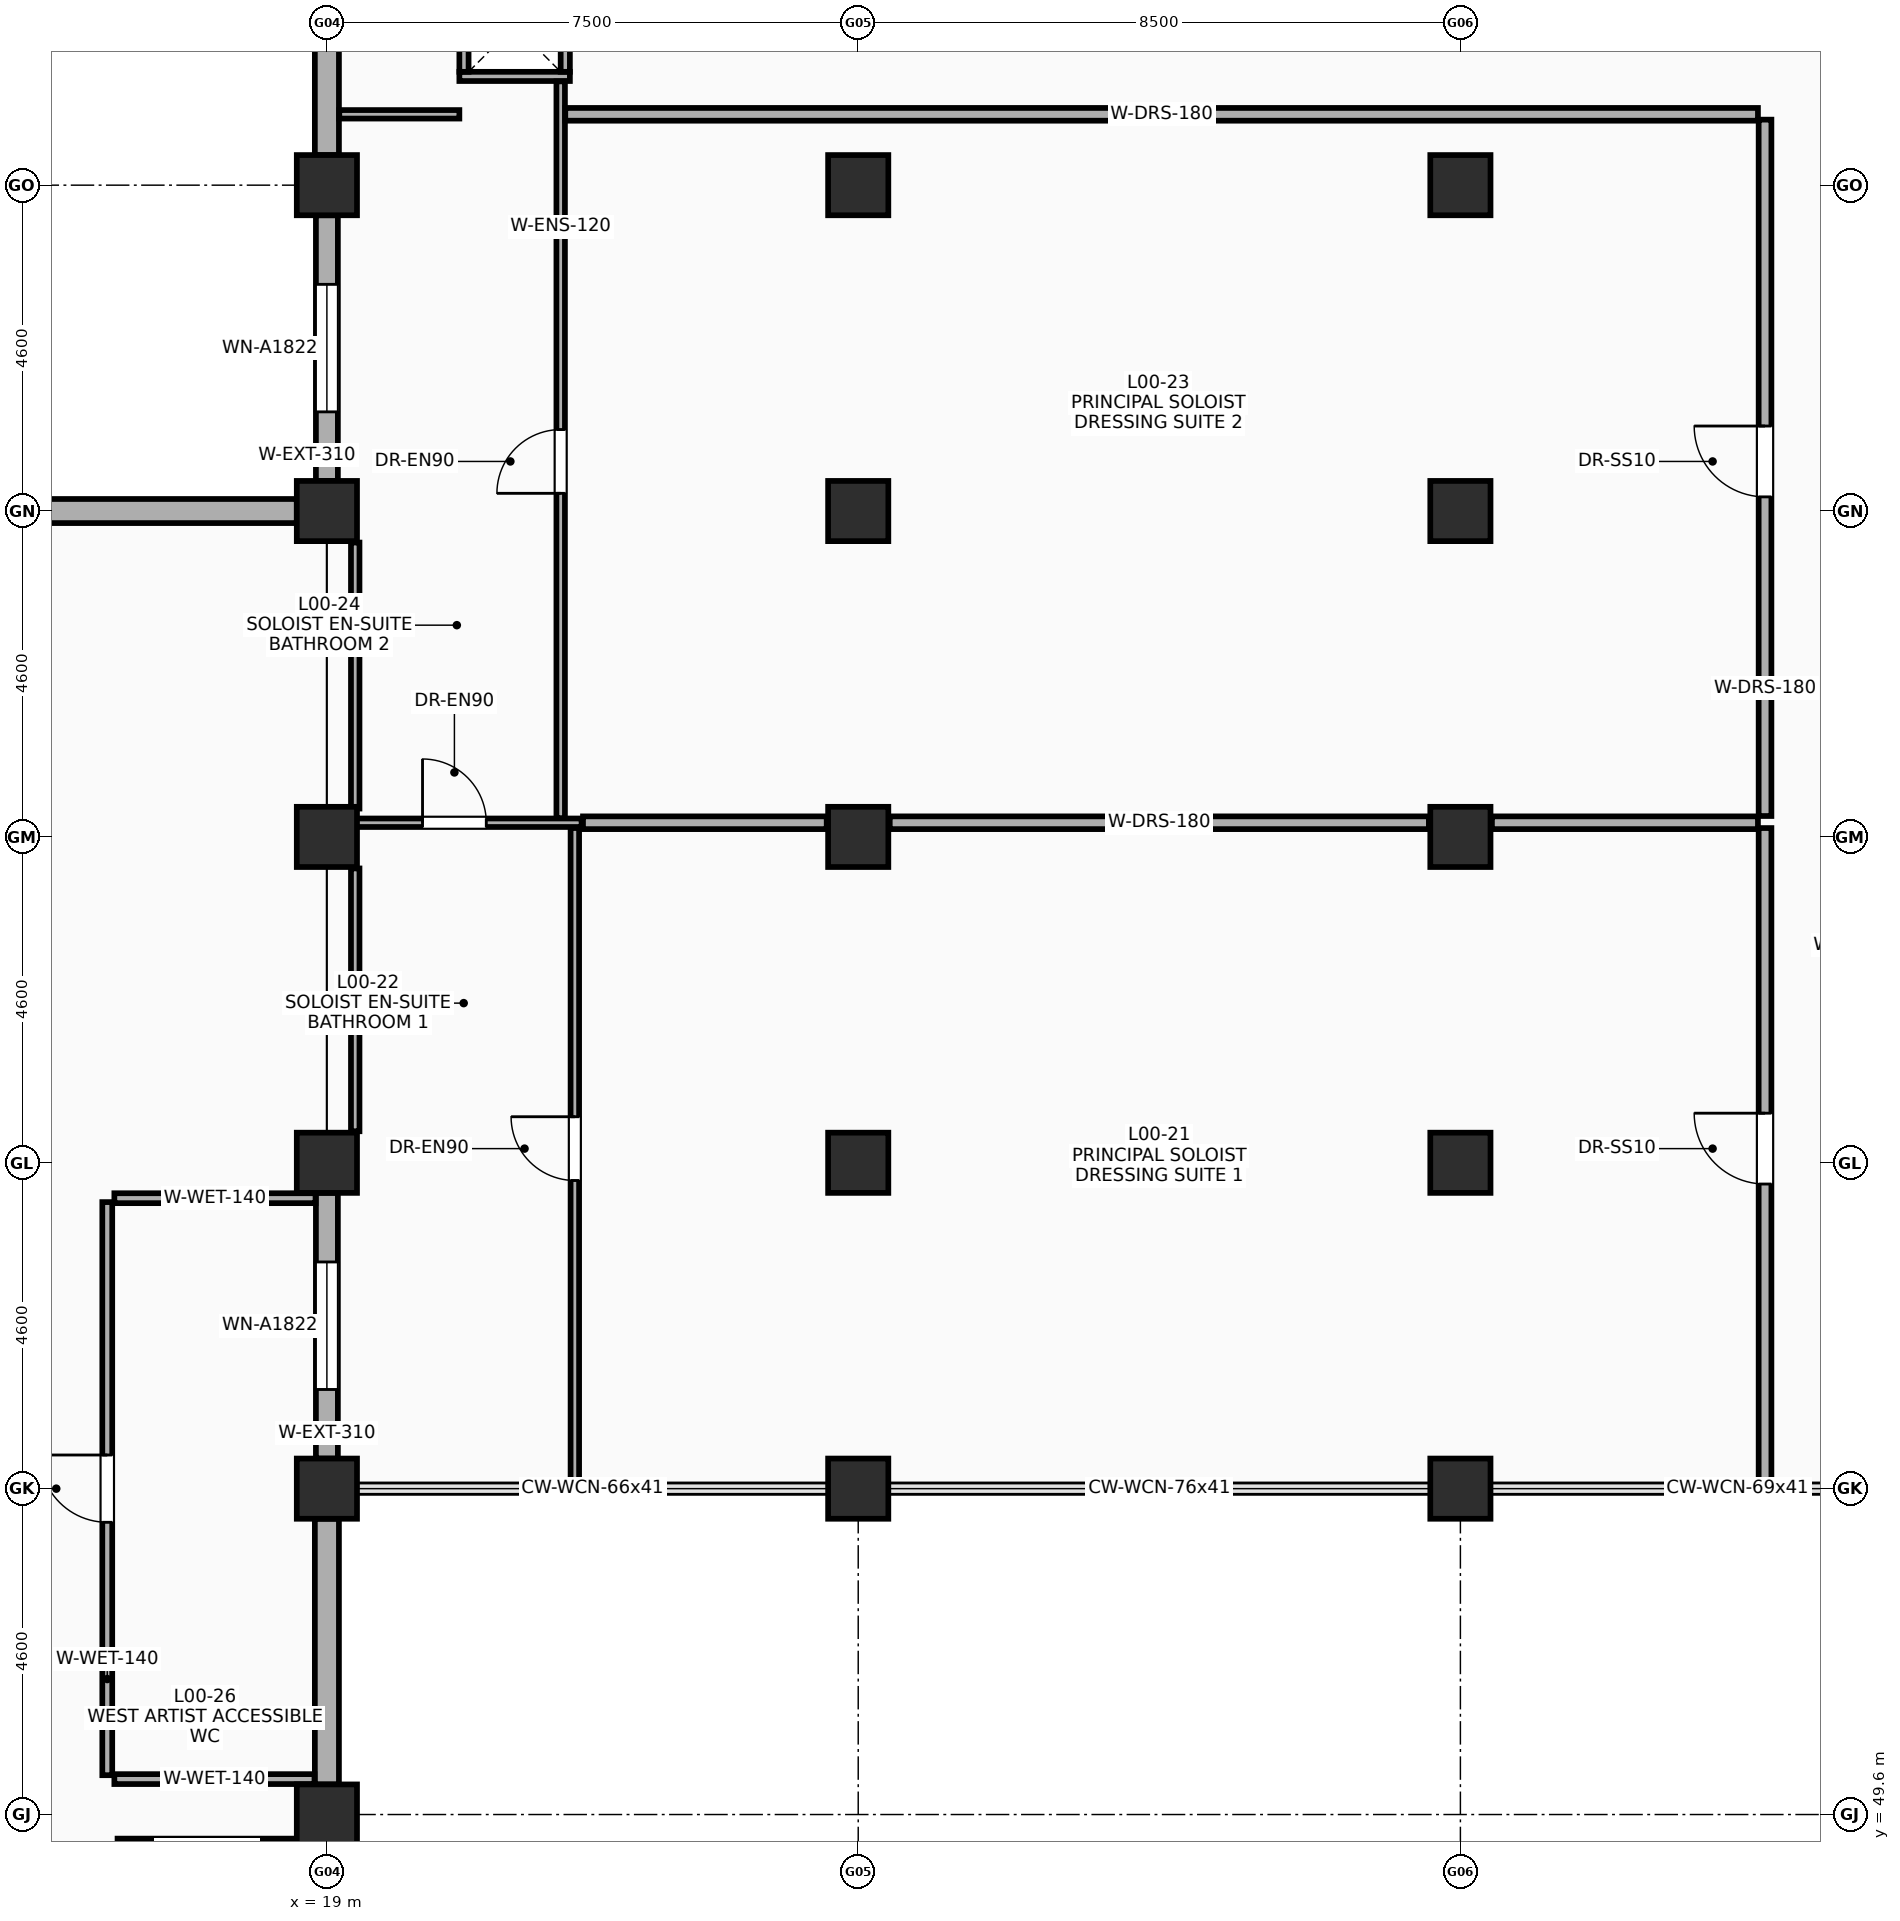
"""IFC4 building model, lengths in metres.
Left out: names, types, materials, properties, quantities, classifications, styles, units other than length and angle.
Written with IfcOpenShell. Run it as: python <this file> out.ifc"""

import sys

from ifc_helpers import new_model, si_unit, direction, frame, frame_2d, origin, origin_2d, place, context, subcontext, project, spatial, rectangle, extrude, element, fill, save


model = new_model("IFC4")
c1 = context("Model", 3, precision=1e-05, world=origin(), true_north=direction((0.0, 1.0)))
c2 = subcontext(c1, "Body", "Model", "MODEL_VIEW")
j1 = project(units=[si_unit("LENGTHUNIT", "METRE"), si_unit("PLANEANGLEUNIT", "RADIAN")], contexts=[c1])
p1 = place(None, origin())
s1 = spatial("IfcSite", under=j1, at=p1, CompositionType="ELEMENT")
p2 = place(p1, origin())
s2 = spatial("IfcBuilding", under=s1, at=p2, CompositionType="ELEMENT")
p3 = place(p2, origin())
s3 = spatial("IfcBuildingStorey", under=s2, at=p3, CompositionType="ELEMENT", Elevation=0.0)
for number, where, z_axis, x_axis in (
    (1, (19.0, 49.6, 0.0), (0.0, 0.0, 1.0), (1.0, 0.0, 0.0)),
    (2, (19.0, 54.2, 0.0), (0.0, 0.0, 1.0), (1.0, 0.0, 0.0)),
    (3, (19.0, 58.8, 0.0), (0.0, 0.0, 1.0), (1.0, 0.0, 0.0)),
    (4, (19.0, 63.4, 0.0), (0.0, 0.0, 1.0), (1.0, 0.0, 0.0)),
    (5, (19.0, 68.0, 0.0), (0.0, 0.0, 1.0), (1.0, 0.0, 0.0)),
    (6, (19.0, 72.6, 0.0), (0.0, 0.0, 1.0), (1.0, 0.0, 0.0)),
    (7, (26.5, 54.2, 0.0), (0.0, 0.0, 1.0), (1.0, 0.0, 0.0)),
    (8, (26.5, 58.8, 0.0), (0.0, 0.0, 1.0), (1.0, 0.0, 0.0)),
    (9, (26.5, 63.4, 0.0), (0.0, 0.0, 1.0), (1.0, 0.0, 0.0)),
    (10, (26.5, 68.0, 0.0), (0.0, 0.0, 1.0), (1.0, 0.0, 0.0)),
    (11, (26.5, 72.6, 0.0), (0.0, 0.0, 1.0), (1.0, 0.0, 0.0)),
    (12, (35.0, 54.2, 0.0), (0.0, 0.0, 1.0), (1.0, 0.0, 0.0)),
    (13, (35.0, 58.8, 0.0), (0.0, 0.0, 1.0), (1.0, 0.0, 0.0)),
    (14, (35.0, 63.4, 0.0), (0.0, 0.0, 1.0), (1.0, 0.0, 0.0)),
    (15, (35.0, 68.0, 0.0), (0.0, 0.0, 1.0), (1.0, 0.0, 0.0)),
    (16, (35.0, 72.6, 0.0), (0.0, 0.0, 1.0), (1.0, 0.0, 0.0)),
):
    element("IfcColumn", number, at=place(p3, frame(where, z_axis=z_axis, x_axis=x_axis)), inside=s3, PredefinedType="COLUMN", context=c2, shape_type="SweptSolid", body=[
        extrude(rectangle(XDim=0.85, YDim=0.85, at=origin_2d()), origin(), (0.0, 0.0, 1.0), 5.4),
    ])
p4 = place(p3, frame((19.0, 54.625, 0.0), z_axis=(0.0, 0.0, 1.0), x_axis=(0.0, 1.0, 0.0)))
e17 = element("IfcWall", 17, at=p4, inside=s3, PredefinedType="SOLIDWALL", context=c2, shape_type="SweptSolid", body=[
    extrude(rectangle(XDim=3.75, YDim=0.31, at=frame_2d((1.875, 0.0))), origin(), (0.0, 0.0, 1.0), 4.15),
])
p5 = place(p4, frame((0.975, 0.0, 0.85)))
e18 = element("IfcOpeningElement", 18, at=p5, cuts=e17, PredefinedType="OPENING", context=c2, shape_type="SweptSolid", body=[
    extrude(rectangle(XDim=1.8, YDim=2.2, at=frame_2d((0.9, 1.1))), frame((0.0, 0.165, 0.0), z_axis=(0.0, -1.0, 0.0), x_axis=(1.0, 0.0, 0.0)), (0.0, 0.0, 1.0), 0.33),
])
p6 = place(p3, frame((19.0, 68.425, 0.0), z_axis=(0.0, 0.0, 1.0), x_axis=(0.0, 1.0, 0.0)))
e19 = element("IfcWall", 19, at=p6, inside=s3, PredefinedType="SOLIDWALL", context=c2, shape_type="SweptSolid", body=[
    extrude(rectangle(XDim=3.75, YDim=0.31, at=frame_2d((1.875, 0.0))), origin(), (0.0, 0.0, 1.0), 4.15),
])
p7 = place(p6, frame((0.975, 0.0, 0.85)))
e20 = element("IfcOpeningElement", 20, at=p7, cuts=e19, PredefinedType="OPENING", context=c2, shape_type="SweptSolid", body=[
    extrude(rectangle(XDim=1.8, YDim=2.2, at=frame_2d((0.9, 1.1))), frame((0.0, 0.165, 0.0), z_axis=(0.0, -1.0, 0.0), x_axis=(1.0, 0.0, 0.0)), (0.0, 0.0, 1.0), 0.33),
])
p8 = place(p3, frame((13.925, 68.0, 0.0), z_axis=(0.0, 0.0, 1.0), x_axis=(1.0, 0.0, 0.0)))
e21 = element("IfcWall", 21, at=p8, inside=s3, PredefinedType="SOLIDWALL", context=c2, shape_type="SweptSolid", body=[
    extrude(rectangle(XDim=4.65, YDim=0.34, at=frame_2d((2.325, 0.0))), origin(), (0.0, 0.0, 1.0), 4.15),
])
p9 = place(p3, frame((19.0, 73.025, 0.0), z_axis=(0.0, 0.0, 1.0), x_axis=(0.0, 1.0, 0.0)))
e22 = element("IfcWall", 22, at=p9, inside=s3, PredefinedType="SOLIDWALL", context=c2, shape_type="SweptSolid", body=[
    extrude(rectangle(XDim=7.75, YDim=0.34, at=frame_2d((3.875, 0.0))), origin(), (0.0, 0.0, 1.0), 4.15),
])
p10 = place(p3, frame((19.0, 50.025, 0.0), z_axis=(0.0, 0.0, 1.0), x_axis=(0.0, 1.0, 0.0)))
e23 = element("IfcWall", 23, at=p10, inside=s3, PredefinedType="SOLIDWALL", context=c2, shape_type="SweptSolid", body=[
    extrude(rectangle(XDim=3.75, YDim=0.34, at=frame_2d((1.875, 0.0))), origin(), (0.0, 0.0, 1.0), 4.15),
])
p11 = place(p3, frame((20.87, 74.135, 0.0), z_axis=(0.0, 0.0, 1.0), x_axis=(1.0, 0.0, 0.0)))
e24 = element("IfcWall", 24, at=p11, inside=s3, PredefinedType="PARTITIONING", context=c2, shape_type="SweptSolid", body=[
    extrude(rectangle(XDim=1.56, YDim=0.13, at=frame_2d((0.78, 0.0))), origin(), (0.0, 0.0, 1.0), 5.1),
])
for number, where, z_axis, x_axis in (
    (25, (20.935, 74.2, 0.0), (0.0, 0.0, 1.0), (0.0, 1.0, 0.0)),
    (26, (22.365, 74.2, 0.0), (0.0, 0.0, 1.0), (0.0, 1.0, 0.0)),
):
    element("IfcWall", number, at=place(p3, frame(where, z_axis=z_axis, x_axis=x_axis)), inside=s3, PredefinedType="PARTITIONING", context=c2, shape_type="SweptSolid", body=[
        extrude(rectangle(XDim=1.3, YDim=0.13, at=frame_2d((0.65, 0.0))), origin(), (0.0, 0.0, 1.0), 5.1),
    ])
p12 = place(p3, frame((22.5, 54.285, 0.0), z_axis=(0.0, 0.0, 1.0), x_axis=(0.0, 1.0, 0.0)))
e27 = element("IfcWall", 27, at=p12, inside=s3, PredefinedType="PARTITIONING", context=c2, shape_type="SweptSolid", body=[
    extrude(rectangle(XDim=9.24, YDim=0.12, at=frame_2d((4.62, 0.0))), origin(), (0.0, 0.0, 1.0), 4.2),
])
p13 = place(p12, frame((4.265, 0.0, 0.0)))
e28 = element("IfcOpeningElement", 28, at=p13, cuts=e27, PredefinedType="OPENING", context=c2, shape_type="SweptSolid", body=[
    extrude(rectangle(XDim=0.9, YDim=2.15, at=frame_2d((0.45, 1.075))), frame((0.0, 0.07, 0.0), z_axis=(0.0, -1.0, 0.0), x_axis=(1.0, 0.0, 0.0)), (0.0, 0.0, 1.0), 0.14),
])
p14 = place(p3, frame((19.4, 63.6, 0.0), z_axis=(0.0, 0.0, 1.0), x_axis=(1.0, 0.0, 0.0)))
e29 = element("IfcWall", 29, at=p14, inside=s3, PredefinedType="PARTITIONING", context=c2, shape_type="SweptSolid", body=[
    extrude(rectangle(XDim=3.195, YDim=0.12, at=frame_2d((1.598, 0.0))), origin(), (0.0, 0.0, 1.0), 4.2),
])
p15 = place(p14, frame((0.95, 0.0, 0.0)))
e30 = element("IfcOpeningElement", 30, at=p15, cuts=e29, PredefinedType="OPENING", context=c2, shape_type="SweptSolid", body=[
    extrude(rectangle(XDim=0.9, YDim=2.15, at=frame_2d((0.45, 1.075))), frame((0.0, 0.07, 0.0), z_axis=(0.0, -1.0, 0.0), x_axis=(1.0, 0.0, 0.0)), (0.0, 0.0, 1.0), 0.14),
])
p16 = place(p3, frame((26.945, 63.6, 0.0), z_axis=(0.0, 0.0, 1.0), x_axis=(1.0, 0.0, 0.0)))
e31 = element("IfcWall", 31, at=p16, inside=s3, PredefinedType="PARTITIONING", context=c2, shape_type="SweptSolid", body=[
    extrude(rectangle(XDim=7.61, YDim=0.18, at=frame_2d((3.805, 0.0))), origin(), (0.0, 0.0, 1.0), 4.2),
])
p17 = place(p3, frame((35.445, 63.6, 0.0), z_axis=(0.0, 0.0, 1.0), x_axis=(1.0, 0.0, 0.0)))
e32 = element("IfcWall", 32, at=p17, inside=s3, PredefinedType="PARTITIONING", context=c2, shape_type="SweptSolid", body=[
    extrude(rectangle(XDim=3.755, YDim=0.18, at=frame_2d((1.877, 0.0))), origin(), (0.0, 0.0, 1.0), 4.2),
])
p18 = place(p3, frame((39.3, 54.285, 0.0), z_axis=(0.0, 0.0, 1.0), x_axis=(0.0, 1.0, 0.0)))
e33 = element("IfcWall", 33, at=p18, inside=s3, PredefinedType="PARTITIONING", context=c2, shape_type="SweptSolid", body=[
    extrude(rectangle(XDim=9.24, YDim=0.18, at=frame_2d((4.62, 0.0))), origin(), (0.0, 0.0, 1.0), 4.2),
])
p19 = place(p18, frame((4.215, 0.0, 0.0)))
e34 = element("IfcOpeningElement", 34, at=p19, cuts=e33, PredefinedType="OPENING", context=c2, shape_type="SweptSolid", body=[
    extrude(rectangle(XDim=1.0, YDim=2.2, at=frame_2d((0.5, 1.1))), frame((0.0, 0.1, 0.0), z_axis=(0.0, -1.0, 0.0), x_axis=(1.0, 0.0, 0.0)), (0.0, 0.0, 1.0), 0.2),
])
p20 = place(p3, frame((22.3, 63.665, 0.0), z_axis=(0.0, 0.0, 1.0), x_axis=(0.0, 1.0, 0.0)))
e35 = element("IfcWall", 35, at=p20, inside=s3, PredefinedType="PARTITIONING", context=c2, shape_type="SweptSolid", body=[
    extrude(rectangle(XDim=10.4, YDim=0.12, at=frame_2d((5.2, 0.0))), origin(), (0.0, 0.0, 1.0), 4.2),
])
p21 = place(p20, frame((4.585, 0.0, 0.0)))
e36 = element("IfcOpeningElement", 36, at=p21, cuts=e35, PredefinedType="OPENING", context=c2, shape_type="SweptSolid", body=[
    extrude(rectangle(XDim=0.9, YDim=2.15, at=frame_2d((0.45, 1.075))), frame((0.0, 0.07, 0.0), z_axis=(0.0, -1.0, 0.0), x_axis=(1.0, 0.0, 0.0)), (0.0, 0.0, 1.0), 0.14),
])
p22 = place(p3, frame((39.3, 63.695, 0.0), z_axis=(0.0, 0.0, 1.0), x_axis=(0.0, 1.0, 0.0)))
e37 = element("IfcWall", 37, at=p22, inside=s3, PredefinedType="PARTITIONING", context=c2, shape_type="SweptSolid", body=[
    extrude(rectangle(XDim=9.83, YDim=0.18, at=frame_2d((4.915, 0.0))), origin(), (0.0, 0.0, 1.0), 4.2),
])
p23 = place(p22, frame((4.505, 0.0, 0.0)))
e38 = element("IfcOpeningElement", 38, at=p23, cuts=e37, PredefinedType="OPENING", context=c2, shape_type="SweptSolid", body=[
    extrude(rectangle(XDim=1.0, YDim=2.2, at=frame_2d((0.5, 1.1))), frame((0.0, 0.1, 0.0), z_axis=(0.0, -1.0, 0.0), x_axis=(1.0, 0.0, 0.0)), (0.0, 0.0, 1.0), 0.2),
])
p24 = place(p3, frame((15.9, 50.155, 0.0), z_axis=(0.0, 0.0, 1.0), x_axis=(0.0, 1.0, 0.0)))
e39 = element("IfcWall", 39, at=p24, inside=s3, PredefinedType="PARTITIONING", context=c2, shape_type="SweptSolid", body=[
    extrude(rectangle(XDim=8.09, YDim=0.14, at=frame_2d((4.045, 0.0))), origin(), (0.0, 0.0, 1.0), 4.4),
])
p25 = place(p24, frame((3.57, 0.0, 0.0)))
e40 = element("IfcOpeningElement", 40, at=p25, cuts=e39, PredefinedType="OPENING", context=c2, shape_type="SweptSolid", body=[
    extrude(rectangle(XDim=0.95, YDim=2.1, at=frame_2d((0.475, 1.05))), frame((0.0, 0.08, 0.0), z_axis=(0.0, -1.0, 0.0), x_axis=(1.0, 0.0, 0.0)), (0.0, 0.0, 1.0), 0.16),
])
p26 = place(p3, frame((19.4, 59.245, 0.0), z_axis=(0.0, 0.0, 1.0), x_axis=(0.0, 1.0, 0.0)))
e41 = element("IfcWall", 41, at=p26, inside=s3, PredefinedType="PARTITIONING", context=c2, shape_type="SweptSolid", body=[
    extrude(rectangle(XDim=3.71, YDim=0.12, at=frame_2d((1.855, 0.0))), origin(), (0.0, 0.0, 1.0), 5.1),
])
p27 = place(p3, frame((19.175, 73.6, 0.0), z_axis=(0.0, 0.0, 1.0), x_axis=(1.0, 0.0, 0.0)))
e42 = element("IfcWall", 42, at=p27, inside=s3, PredefinedType="PARTITIONING", context=c2, shape_type="SweptSolid", body=[
    extrude(rectangle(XDim=1.695, YDim=0.12, at=frame_2d((0.848, 0.0))), origin(), (0.0, 0.0, 1.0), 4.2),
])
p28 = place(p3, frame((19.4, 63.8, 0.0), z_axis=(0.0, 0.0, 1.0), x_axis=(0.0, 1.0, 0.0)))
e43 = element("IfcWall", 43, at=p28, inside=s3, PredefinedType="PARTITIONING", context=c2, shape_type="SweptSolid", body=[
    extrude(rectangle(XDim=3.755, YDim=0.12, at=frame_2d((1.877, 0.0))), origin(), (0.0, 0.0, 1.0), 4.2),
])
p29 = place(p3, frame((22.365, 73.6, 0.0), z_axis=(0.0, 0.0, 1.0), x_axis=(1.0, 0.0, 0.0)))
e44 = element("IfcWall", 44, at=p29, inside=s3, PredefinedType="PARTITIONING", context=c2, shape_type="SweptSolid", body=[
    extrude(rectangle(XDim=16.835, YDim=0.18, at=frame_2d((8.417, 0.0))), origin(), (0.0, 0.0, 1.0), 4.2),
])
p30 = place(p3, frame((16.045, 49.1, 0.0), z_axis=(0.0, 0.0, 1.0), x_axis=(1.0, 0.0, 0.0)))
e45 = element("IfcWall", 45, at=p30, inside=s3, PredefinedType="PARTITIONING", context=c2, shape_type="SweptSolid", body=[
    extrude(rectangle(XDim=2.525, YDim=0.32, at=frame_2d((1.263, 0.0))), origin(), (0.0, 0.0, 1.0), 5.1),
])
p31 = place(p3, frame((16.0, 50.1, 0.0), z_axis=(0.0, 0.0, 1.0), x_axis=(1.0, 0.0, 0.0)))
e46 = element("IfcWall", 46, at=p31, inside=s3, PredefinedType="PARTITIONING", context=c2, shape_type="SweptSolid", body=[
    extrude(rectangle(XDim=2.825, YDim=0.14, at=frame_2d((1.413, 0.0))), origin(), (0.0, 0.0, 1.0), 4.4),
])
p32 = place(p3, frame((16.0, 58.3, 0.0), z_axis=(0.0, 0.0, 1.0), x_axis=(1.0, 0.0, 0.0)))
e47 = element("IfcWall", 47, at=p32, inside=s3, PredefinedType="PARTITIONING", context=c2, shape_type="SweptSolid", body=[
    extrude(rectangle(XDim=2.84, YDim=0.14, at=frame_2d((1.42, 0.0))), origin(), (0.0, 0.0, 1.0), 4.4),
])
p33 = place(p3, frame((22.615, 63.6, 0.0), z_axis=(0.0, 0.0, 1.0), x_axis=(1.0, 0.0, 0.0)))
e48 = element("IfcWall", 48, at=p33, inside=s3, PredefinedType="PARTITIONING", context=c2, shape_type="SweptSolid", body=[
    extrude(rectangle(XDim=3.44, YDim=0.18, at=frame_2d((1.72, 0.0))), origin(), (0.0, 0.0, 1.0), 4.2),
])
p34 = place(p5, origin())
e49 = element("IfcWindow", 49, at=p34, inside=s3, PartitioningType="SINGLE_PANEL", PredefinedType="WINDOW", context=c2, shape_type="SweptSolid", body=[
    extrude(rectangle(XDim=1.8, YDim=2.2, at=frame_2d((0.9, 1.1))), frame((0.0, 0.03, 0.0), z_axis=(0.0, -1.0, 0.0), x_axis=(1.0, 0.0, 0.0)), (0.0, 0.0, 1.0), 0.06),
])
fill(e18, e49)
p35 = place(p7, origin())
e50 = element("IfcWindow", 50, at=p35, inside=s3, PartitioningType="SINGLE_PANEL", PredefinedType="WINDOW", context=c2, shape_type="SweptSolid", body=[
    extrude(rectangle(XDim=1.8, YDim=2.2, at=frame_2d((0.9, 1.1))), frame((0.0, 0.03, 0.0), z_axis=(0.0, -1.0, 0.0), x_axis=(1.0, 0.0, 0.0)), (0.0, 0.0, 1.0), 0.06),
])
fill(e20, e50)
p36 = place(p13, origin())
e51 = element("IfcDoor", 51, at=p36, inside=s3, OperationType="SINGLE_SWING_RIGHT", PredefinedType="DOOR", context=c2, shape_type="SweptSolid", body=[
    extrude(rectangle(XDim=0.9, YDim=2.15, at=frame_2d((0.45, 1.075))), frame((0.0, 0.025, 0.0), z_axis=(0.0, -1.0, 0.0), x_axis=(1.0, 0.0, 0.0)), (0.0, 0.0, 1.0), 0.05),
])
fill(e28, e51)
p37 = place(p15, origin())
e52 = element("IfcDoor", 52, at=p37, inside=s3, OperationType="SINGLE_SWING_LEFT", PredefinedType="DOOR", context=c2, shape_type="SweptSolid", body=[
    extrude(rectangle(XDim=0.9, YDim=2.15, at=frame_2d((0.45, 1.075))), frame((0.0, 0.025, 0.0), z_axis=(0.0, -1.0, 0.0), x_axis=(1.0, 0.0, 0.0)), (0.0, 0.0, 1.0), 0.05),
])
fill(e30, e52)
p38 = place(p19, origin())
e53 = element("IfcDoor", 53, at=p38, inside=s3, OperationType="SINGLE_SWING_RIGHT", PredefinedType="DOOR", context=c2, shape_type="SweptSolid", body=[
    extrude(rectangle(XDim=1.0, YDim=2.2, at=frame_2d((0.5, 1.1))), frame((0.0, 0.025, 0.0), z_axis=(0.0, -1.0, 0.0), x_axis=(1.0, 0.0, 0.0)), (0.0, 0.0, 1.0), 0.05),
])
fill(e34, e53)
p39 = place(p21, origin())
e54 = element("IfcDoor", 54, at=p39, inside=s3, OperationType="SINGLE_SWING_LEFT", PredefinedType="DOOR", context=c2, shape_type="SweptSolid", body=[
    extrude(rectangle(XDim=0.9, YDim=2.15, at=frame_2d((0.45, 1.075))), frame((0.0, 0.025, 0.0), z_axis=(0.0, -1.0, 0.0), x_axis=(1.0, 0.0, 0.0)), (0.0, 0.0, 1.0), 0.05),
])
fill(e36, e54)
p40 = place(p23, origin())
e55 = element("IfcDoor", 55, at=p40, inside=s3, OperationType="SINGLE_SWING_RIGHT", PredefinedType="DOOR", context=c2, shape_type="SweptSolid", body=[
    extrude(rectangle(XDim=1.0, YDim=2.2, at=frame_2d((0.5, 1.1))), frame((0.0, 0.025, 0.0), z_axis=(0.0, -1.0, 0.0), x_axis=(1.0, 0.0, 0.0)), (0.0, 0.0, 1.0), 0.05),
])
fill(e38, e55)
p41 = place(p25, origin())
e56 = element("IfcDoor", 56, at=p41, inside=s3, OperationType="SINGLE_SWING_RIGHT", PredefinedType="DOOR", context=c2, shape_type="SweptSolid", body=[
    extrude(rectangle(XDim=0.95, YDim=2.1, at=frame_2d((0.475, 1.05))), frame((0.0, 0.025, 0.0), z_axis=(0.0, -1.0, 0.0), x_axis=(1.0, 0.0, 0.0)), (0.0, 0.0, 1.0), 0.05),
])
fill(e40, e56)
save(model, sys.argv[1])
